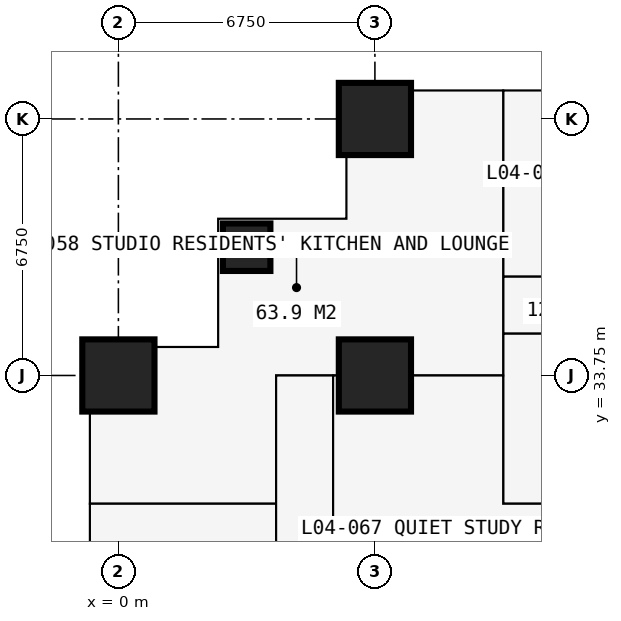
"""IFC4 building model, lengths in metres.
Left out: names, types, materials, properties, quantities, classifications, styles, units other than length and angle.
Written with IfcOpenShell. Run it as: python <this file> out.ifc"""

import sys

from ifc_helpers import new_model, si_unit, direction, frame, frame_2d, origin, origin_2d, place, context, subcontext, project, spatial, rectangle, extrude, element, fill, save


model = new_model("IFC4")
c1 = context("Model", 3, precision=1e-05, world=origin(), true_north=direction((0.0, 1.0)))
c2 = subcontext(c1, "Body", "Model", "MODEL_VIEW")
j1 = project(units=[si_unit("LENGTHUNIT", "METRE"), si_unit("PLANEANGLEUNIT", "RADIAN")], contexts=[c1])
p1 = place(None, origin())
s1 = spatial("IfcSite", under=j1, at=p1, CompositionType="ELEMENT")
p2 = place(p1, origin())
s2 = spatial("IfcBuilding", under=s1, at=p2, CompositionType="ELEMENT")
p3 = place(p2, frame((0.0, 0.0, 18.0)))
s3 = spatial("IfcBuildingStorey", under=s2, at=p3, CompositionType="ELEMENT", Elevation=18.0)
p4 = place(p3, frame((0.0, 33.75, 0.0), z_axis=(0.0, 0.0, 1.0), x_axis=(1.0, 0.0, 0.0)))
e1 = element("IfcColumn", 1, at=p4, inside=s3, PredefinedType="COLUMN", context=c2, shape_type="SweptSolid", body=[
    extrude(rectangle(XDim=1.9, YDim=1.9, at=origin_2d()), origin(), (0.0, 0.0, 1.0), 3.6),
])
p5 = place(p3, frame((3.375, 37.125, 0.0), z_axis=(0.0, 0.0, 1.0), x_axis=(1.0, 0.0, 0.0)))
e2 = element("IfcColumn", 2, at=p5, inside=s3, PredefinedType="COLUMN", context=c2, shape_type="SweptSolid", body=[
    extrude(rectangle(XDim=1.25, YDim=1.25, at=origin_2d()), origin(), (0.0, 0.0, 1.0), 3.6),
])
for number, where, z_axis, x_axis in (
    (3, (6.75, 33.75, 0.0), (0.0, 0.0, 1.0), (1.0, 0.0, 0.0)),
    (4, (6.75, 40.5, 0.0), (0.0, 0.0, 1.0), (1.0, 0.0, 0.0)),
):
    element("IfcColumn", number, at=place(p3, frame(where, z_axis=z_axis, x_axis=x_axis)), inside=s3, PredefinedType="COLUMN", context=c2, shape_type="SweptSolid", body=[
        extrude(rectangle(XDim=1.9, YDim=1.9, at=origin_2d()), origin(), (0.0, 0.0, 1.0), 3.6),
    ])
p6 = place(p3, frame((6.0, 41.25, 0.0), z_axis=(0.0, 0.0, 1.0), x_axis=(0.0, -1.0, 0.0)))
e5 = element("IfcWall", 5, at=p6, inside=s3, PredefinedType="SOLIDWALL", context=c2, shape_type="SweptSolid", body=[
    extrude(rectangle(XDim=3.375, YDim=0.3, at=frame_2d((1.688, 0.0))), origin(), (0.0, 0.0, 1.0), 3.375),
])
p7 = place(p6, frame((1.857, 0.0, 0.9)))
e6 = element("IfcOpeningElement", 6, at=p7, cuts=e5, PredefinedType="OPENING", context=c2, shape_type="SweptSolid", body=[
    extrude(rectangle(XDim=1.2, YDim=1.8, at=frame_2d((0.6, 0.9))), frame((0.0, 0.16, 0.0), z_axis=(0.0, -1.0, 0.0), x_axis=(1.0, 0.0, 0.0)), (0.0, 0.0, 1.0), 0.32),
])
p8 = place(p3, frame((6.0, 37.875, 0.0), z_axis=(0.0, 0.0, 1.0), x_axis=(-1.0, 0.0, 0.0)))
e7 = element("IfcWall", 7, at=p8, inside=s3, PredefinedType="SOLIDWALL", context=c2, shape_type="SweptSolid", body=[
    extrude(rectangle(XDim=3.375, YDim=0.3, at=frame_2d((1.688, 0.0))), origin(), (0.0, 0.0, 1.0), 3.375),
])
p9 = place(p8, frame((0.788, 0.0, 0.6)))
e8 = element("IfcOpeningElement", 8, at=p9, cuts=e7, PredefinedType="OPENING", context=c2, shape_type="SweptSolid", body=[
    extrude(rectangle(XDim=1.8, YDim=2.1, at=frame_2d((0.9, 1.05))), frame((0.0, 0.16, 0.0), z_axis=(0.0, -1.0, 0.0), x_axis=(1.0, 0.0, 0.0)), (0.0, 0.0, 1.0), 0.32),
])
p10 = place(p3, frame((2.625, 37.875, 0.0), z_axis=(0.0, 0.0, 1.0), x_axis=(0.0, -1.0, 0.0)))
e9 = element("IfcWall", 9, at=p10, inside=s3, PredefinedType="SOLIDWALL", context=c2, shape_type="SweptSolid", body=[
    extrude(rectangle(XDim=3.375, YDim=0.3, at=frame_2d((1.688, 0.0))), origin(), (0.0, 0.0, 1.0), 3.375),
])
p11 = place(p10, frame((0.788, 0.0, 0.6)))
e10 = element("IfcOpeningElement", 10, at=p11, cuts=e9, PredefinedType="OPENING", context=c2, shape_type="SweptSolid", body=[
    extrude(rectangle(XDim=1.8, YDim=2.1, at=frame_2d((0.9, 1.05))), frame((0.0, 0.16, 0.0), z_axis=(0.0, -1.0, 0.0), x_axis=(1.0, 0.0, 0.0)), (0.0, 0.0, 1.0), 0.32),
])
p12 = place(p3, frame((2.625, 34.5, 0.0), z_axis=(0.0, 0.0, 1.0), x_axis=(-1.0, 0.0, 0.0)))
e11 = element("IfcWall", 11, at=p12, inside=s3, PredefinedType="SOLIDWALL", context=c2, shape_type="SweptSolid", body=[
    extrude(rectangle(XDim=3.375, YDim=0.3, at=frame_2d((1.688, 0.0))), origin(), (0.0, 0.0, 1.0), 3.375),
])
p13 = place(p12, frame((0.317, 0.0, 0.9)))
e12 = element("IfcOpeningElement", 12, at=p13, cuts=e11, PredefinedType="OPENING", context=c2, shape_type="SweptSolid", body=[
    extrude(rectangle(XDim=1.2, YDim=1.8, at=frame_2d((0.6, 0.9))), frame((0.0, 0.16, 0.0), z_axis=(0.0, -1.0, 0.0), x_axis=(1.0, 0.0, 0.0)), (0.0, 0.0, 1.0), 0.32),
])
p14 = place(p3, frame((-0.734, 30.375, 0.0), z_axis=(0.0, 0.0, 1.0), x_axis=(1.0, 0.0, 0.0)))
e13 = element("IfcWall", 13, at=p14, inside=s3, PredefinedType="PARTITIONING", context=c2, shape_type="SweptSolid", body=[
    extrude(rectangle(XDim=4.884, YDim=0.15, at=frame_2d((2.442, 0.0))), origin(), (0.0, 0.0, 1.0), 3.375),
])
p15 = place(p3, frame((4.15, 10.125, 0.0), z_axis=(0.0, 0.0, 1.0), x_axis=(0.0, 1.0, 0.0)))
e14 = element("IfcWall", 14, at=p15, inside=s3, PredefinedType="PARTITIONING", context=c2, shape_type="SweptSolid", body=[
    extrude(rectangle(XDim=23.625, YDim=0.15, at=frame_2d((11.812, 0.0))), origin(), (0.0, 0.0, 1.0), 3.375),
])
p16 = place(p15, frame((4.2, 0.0, 0.0)))
e15 = element("IfcOpeningElement", 15, at=p16, cuts=e14, PredefinedType="OPENING", context=c2, shape_type="SweptSolid", body=[
    extrude(rectangle(XDim=0.95, YDim=2.2, at=frame_2d((0.475, 1.1))), frame((0.0, 0.085, 0.0), z_axis=(0.0, -1.0, 0.0), x_axis=(1.0, 0.0, 0.0)), (0.0, 0.0, 1.0), 0.17),
])
p17 = place(p15, frame((10.95, 0.0, 0.0)))
e16 = element("IfcOpeningElement", 16, at=p17, cuts=e14, PredefinedType="OPENING", context=c2, shape_type="SweptSolid", body=[
    extrude(rectangle(XDim=0.95, YDim=2.2, at=frame_2d((0.475, 1.1))), frame((0.0, 0.085, 0.0), z_axis=(0.0, -1.0, 0.0), x_axis=(1.0, 0.0, 0.0)), (0.0, 0.0, 1.0), 0.17),
])
p18 = place(p15, frame((17.7, 0.0, 0.0)))
e17 = element("IfcOpeningElement", 17, at=p18, cuts=e14, PredefinedType="OPENING", context=c2, shape_type="SweptSolid", body=[
    extrude(rectangle(XDim=0.95, YDim=2.2, at=frame_2d((0.475, 1.1))), frame((0.0, 0.085, 0.0), z_axis=(0.0, -1.0, 0.0), x_axis=(1.0, 0.0, 0.0)), (0.0, 0.0, 1.0), 0.17),
])
p19 = place(p3, frame((4.15, 33.75, 0.0), z_axis=(0.0, 0.0, 1.0), x_axis=(1.0, 0.0, 0.0)))
e18 = element("IfcWall", 18, at=p19, inside=s3, PredefinedType="PARTITIONING", context=c2, shape_type="SweptSolid", body=[
    extrude(rectangle(XDim=5.975, YDim=0.15, at=frame_2d((2.988, 0.0))), origin(), (0.0, 0.0, 1.0), 2.877),
])
p20 = place(p3, frame((5.65, 22.988, 0.0), z_axis=(0.0, 0.0, 1.0), x_axis=(0.0, 1.0, 0.0)))
e19 = element("IfcWall", 19, at=p20, inside=s3, PredefinedType="PARTITIONING", context=c2, shape_type="SweptSolid", body=[
    extrude(rectangle(XDim=10.762, YDim=0.15, at=frame_2d((5.381, 0.0))), origin(), (0.0, 0.0, 1.0), 3.375),
])
p21 = place(p20, frame((5.0, 0.0, 0.0)))
e20 = element("IfcOpeningElement", 20, at=p21, cuts=e19, PredefinedType="OPENING", context=c2, shape_type="SweptSolid", body=[
    extrude(rectangle(XDim=0.95, YDim=2.2, at=frame_2d((0.475, 1.1))), frame((0.0, 0.085, 0.0), z_axis=(0.0, -1.0, 0.0), x_axis=(1.0, 0.0, 0.0)), (0.0, 0.0, 1.0), 0.17),
])
p22 = place(p3, frame((10.125, 30.375, 0.0), z_axis=(0.0, 0.0, 1.0), x_axis=(0.0, 1.0, 0.0)))
e21 = element("IfcWall", 21, at=p22, inside=s3, PredefinedType="PARTITIONING", context=c2, shape_type="SweptSolid", body=[
    extrude(rectangle(XDim=10.859, YDim=0.15, at=frame_2d((5.429, 0.0))), origin(), (0.0, 0.0, 1.0), 3.375),
])
p23 = place(p22, frame((4.725, 0.0, 0.0)))
e22 = element("IfcOpeningElement", 22, at=p23, cuts=e21, PredefinedType="OPENING", context=c2, shape_type="SweptSolid", body=[
    extrude(rectangle(XDim=1.0, YDim=2.2, at=frame_2d((0.5, 1.1))), frame((0.0, 0.085, 0.0), z_axis=(0.0, -1.0, 0.0), x_axis=(1.0, 0.0, 0.0)), (0.0, 0.0, 1.0), 0.17),
])
p24 = place(p3, frame((10.125, 30.375, 0.0), z_axis=(0.0, 0.0, 1.0), x_axis=(1.0, 0.0, 0.0)))
e23 = element("IfcWall", 23, at=p24, inside=s3, PredefinedType="PARTITIONING", context=c2, shape_type="SweptSolid", body=[
    extrude(rectangle(XDim=1.175, YDim=0.15, at=frame_2d((0.587, 0.0))), origin(), (0.0, 0.0, 1.0), 3.375),
])
p25 = place(p3, frame((10.125, 34.85, 0.0), z_axis=(0.0, 0.0, 1.0), x_axis=(1.0, 0.0, 0.0)))
e24 = element("IfcWall", 24, at=p25, inside=s3, PredefinedType="PARTITIONING", context=c2, shape_type="SweptSolid", body=[
    extrude(rectangle(XDim=10.762, YDim=0.15, at=frame_2d((5.381, 0.0))), origin(), (0.0, 0.0, 1.0), 3.375),
])
p26 = place(p25, frame((4.9, 0.0, 0.0)))
e25 = element("IfcOpeningElement", 25, at=p26, cuts=e24, PredefinedType="OPENING", context=c2, shape_type="SweptSolid", body=[
    extrude(rectangle(XDim=0.95, YDim=2.2, at=frame_2d((0.475, 1.1))), frame((0.0, 0.085, 0.0), z_axis=(0.0, -1.0, 0.0), x_axis=(1.0, 0.0, 0.0)), (0.0, 0.0, 1.0), 0.17),
])
p27 = place(p3, frame((10.125, 36.35, 0.0), z_axis=(0.0, 0.0, 1.0), x_axis=(1.0, 0.0, 0.0)))
e26 = element("IfcWall", 26, at=p27, inside=s3, PredefinedType="PARTITIONING", context=c2, shape_type="SweptSolid", body=[
    extrude(rectangle(XDim=23.625, YDim=0.1, at=frame_2d((11.812, 0.0))), origin(), (0.0, 0.0, 1.0), 3.375),
])
p28 = place(p27, frame((0.2, 0.0, 0.0)))
e27 = element("IfcOpeningElement", 27, at=p28, cuts=e26, PredefinedType="OPENING", context=c2, shape_type="SweptSolid", body=[
    extrude(rectangle(XDim=0.95, YDim=2.2, at=frame_2d((0.475, 1.1))), frame((0.0, 0.06, 0.0), z_axis=(0.0, -1.0, 0.0), x_axis=(1.0, 0.0, 0.0)), (0.0, 0.0, 1.0), 0.12),
])
p29 = place(p27, frame((3.625, 0.0, 0.0)))
e28 = element("IfcOpeningElement", 28, at=p29, cuts=e26, PredefinedType="OPENING", context=c2, shape_type="SweptSolid", body=[
    extrude(rectangle(XDim=0.95, YDim=2.2, at=frame_2d((0.475, 1.1))), frame((0.0, 0.06, 0.0), z_axis=(0.0, -1.0, 0.0), x_axis=(1.0, 0.0, 0.0)), (0.0, 0.0, 1.0), 0.12),
])
p30 = place(p27, frame((7.0, 0.0, 0.0)))
e29 = element("IfcOpeningElement", 29, at=p30, cuts=e26, PredefinedType="OPENING", context=c2, shape_type="SweptSolid", body=[
    extrude(rectangle(XDim=0.95, YDim=2.2, at=frame_2d((0.475, 1.1))), frame((0.0, 0.06, 0.0), z_axis=(0.0, -1.0, 0.0), x_axis=(1.0, 0.0, 0.0)), (0.0, 0.0, 1.0), 0.12),
])
p31 = place(p27, frame((10.375, 0.0, 0.0)))
e30 = element("IfcOpeningElement", 30, at=p31, cuts=e26, PredefinedType="OPENING", context=c2, shape_type="SweptSolid", body=[
    extrude(rectangle(XDim=0.95, YDim=2.2, at=frame_2d((0.475, 1.1))), frame((0.0, 0.06, 0.0), z_axis=(0.0, -1.0, 0.0), x_axis=(1.0, 0.0, 0.0)), (0.0, 0.0, 1.0), 0.12),
])
p32 = place(p27, frame((13.75, 0.0, 0.0)))
e31 = element("IfcOpeningElement", 31, at=p32, cuts=e26, PredefinedType="OPENING", context=c2, shape_type="SweptSolid", body=[
    extrude(rectangle(XDim=0.95, YDim=2.2, at=frame_2d((0.475, 1.1))), frame((0.0, 0.06, 0.0), z_axis=(0.0, -1.0, 0.0), x_axis=(1.0, 0.0, 0.0)), (0.0, 0.0, 1.0), 0.12),
])
p33 = place(p7, origin())
e32 = element("IfcWindow", 32, at=p33, inside=s3, PartitioningType="SINGLE_PANEL", PredefinedType="WINDOW", context=c2, shape_type="SweptSolid", body=[
    extrude(rectangle(XDim=1.2, YDim=1.8, at=frame_2d((0.6, 0.9))), frame((0.0, 0.03, 0.0), z_axis=(0.0, -1.0, 0.0), x_axis=(1.0, 0.0, 0.0)), (0.0, 0.0, 1.0), 0.06),
])
fill(e6, e32)
p34 = place(p9, origin())
e33 = element("IfcWindow", 33, at=p34, inside=s3, PartitioningType="SINGLE_PANEL", PredefinedType="WINDOW", context=c2, shape_type="SweptSolid", body=[
    extrude(rectangle(XDim=1.8, YDim=2.1, at=frame_2d((0.9, 1.05))), frame((0.0, 0.03, 0.0), z_axis=(0.0, -1.0, 0.0), x_axis=(1.0, 0.0, 0.0)), (0.0, 0.0, 1.0), 0.06),
])
fill(e8, e33)
p35 = place(p11, origin())
e34 = element("IfcWindow", 34, at=p35, inside=s3, PartitioningType="SINGLE_PANEL", PredefinedType="WINDOW", context=c2, shape_type="SweptSolid", body=[
    extrude(rectangle(XDim=1.8, YDim=2.1, at=frame_2d((0.9, 1.05))), frame((0.0, 0.03, 0.0), z_axis=(0.0, -1.0, 0.0), x_axis=(1.0, 0.0, 0.0)), (0.0, 0.0, 1.0), 0.06),
])
fill(e10, e34)
p36 = place(p13, origin())
e35 = element("IfcWindow", 35, at=p36, inside=s3, PartitioningType="SINGLE_PANEL", PredefinedType="WINDOW", context=c2, shape_type="SweptSolid", body=[
    extrude(rectangle(XDim=1.2, YDim=1.8, at=frame_2d((0.6, 0.9))), frame((0.0, 0.03, 0.0), z_axis=(0.0, -1.0, 0.0), x_axis=(1.0, 0.0, 0.0)), (0.0, 0.0, 1.0), 0.06),
])
fill(e12, e35)
p37 = place(p28, origin())
e36 = element("IfcDoor", 36, at=p37, inside=s3, OperationType="SINGLE_SWING_LEFT", PredefinedType="DOOR", context=c2, shape_type="SweptSolid", body=[
    extrude(rectangle(XDim=0.95, YDim=2.2, at=frame_2d((0.475, 1.1))), frame((0.0, 0.025, 0.0), z_axis=(0.0, -1.0, 0.0), x_axis=(1.0, 0.0, 0.0)), (0.0, 0.0, 1.0), 0.05),
])
fill(e27, e36)
p38 = place(p23, origin())
e37 = element("IfcDoor", 37, at=p38, inside=s3, OperationType="SINGLE_SWING_LEFT", PredefinedType="DOOR", context=c2, shape_type="SweptSolid", body=[
    extrude(rectangle(XDim=1.0, YDim=2.2, at=frame_2d((0.5, 1.1))), frame((0.0, 0.025, 0.0), z_axis=(0.0, -1.0, 0.0), x_axis=(1.0, 0.0, 0.0)), (0.0, 0.0, 1.0), 0.05),
])
fill(e22, e37)
save(model, sys.argv[1])
